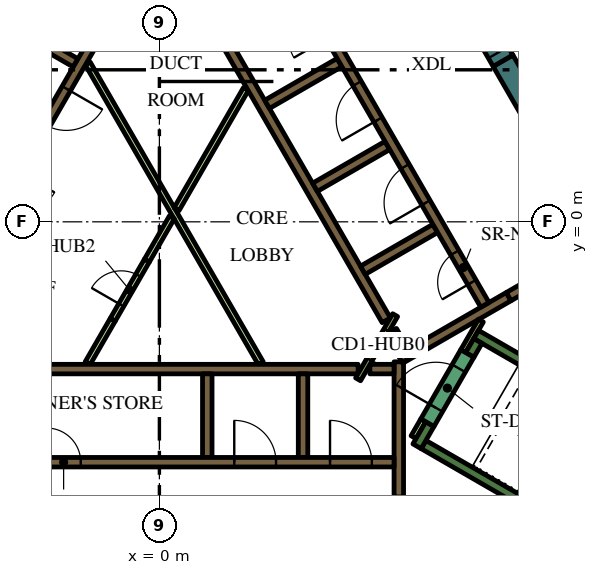
"""IFC4 building model, lengths in metres.
Left out: names, types, materials, properties, quantities, classifications, styles, units other than length and angle.
Written with IfcOpenShell. Run it as: python <this file> out.ifc"""

import sys

from ifc_helpers import new_model, si_unit, direction, frame, frame_2d, origin, place, context, subcontext, project, spatial, rectangle, extrude, element, fill, save


model = new_model("IFC4")
c1 = context("Model", 3, precision=1e-05, world=origin(), true_north=direction((0.0, 1.0)))
c2 = subcontext(c1, "Body", "Model", "MODEL_VIEW")
j1 = project(units=[si_unit("LENGTHUNIT", "METRE"), si_unit("PLANEANGLEUNIT", "RADIAN")], contexts=[c1])
p1 = place(None, origin())
s1 = spatial("IfcSite", under=j1, at=p1, CompositionType="ELEMENT")
p2 = place(p1, origin())
s2 = spatial("IfcBuilding", under=s1, at=p2, CompositionType="ELEMENT")
p3 = place(p2, frame((0.0, 0.0, 275.4)))
s3 = spatial("IfcBuildingStorey", under=s2, at=p3, CompositionType="ELEMENT", Elevation=275.4)
p4 = place(p3, frame((9.042, 4.239, 0.0), z_axis=(0.0, 0.0, 1.0), x_axis=(0.500005785455, -0.866022063525, 0.0)))
e1 = element("IfcWall", 1, at=p4, inside=s3, PredefinedType="SOLIDWALL", context=c2, shape_type="SweptSolid", body=[
    extrude(rectangle(XDim=12.406, YDim=0.6, at=frame_2d((6.203, 0.0))), origin(), (0.0, 0.0, 1.0), 4.2),
])
p5 = place(p3, frame((12.84, -9.261, 0.0), z_axis=(0.0, 0.0, 1.0), x_axis=(-0.866013990052, 0.500019768644, 0.0)))
e2 = element("IfcWall", 2, at=p5, inside=s3, PredefinedType="SOLIDWALL", context=c2, shape_type="SweptSolid", body=[
    extrude(rectangle(XDim=6.8, YDim=0.25, at=frame_2d((3.4, 0.0))), origin(), (0.0, 0.0, 1.0), 4.2),
])
p6 = place(p3, frame((6.78, -5.906, 0.0), z_axis=(0.0, 0.0, 1.0), x_axis=(0.500223362819, 0.865896406789, 0.0)))
e3 = element("IfcWall", 3, at=p6, inside=s3, PredefinedType="SOLIDWALL", context=c2, shape_type="SweptSolid", body=[
    extrude(rectangle(XDim=0.675, YDim=0.25, at=frame_2d((0.337, 0.0))), origin(), (0.0, 0.0, 1.0), 4.2),
])
p7 = place(p3, frame((8.334, -2.964, 0.0), z_axis=(0.0, 0.0, 1.0), x_axis=(0.866016039709, -0.500016218704, 0.0)))
e4 = element("IfcWall", 4, at=p7, inside=s3, PredefinedType="SOLIDWALL", context=c2, shape_type="SweptSolid", body=[
    extrude(rectangle(XDim=7.05, YDim=0.25, at=frame_2d((3.525, 0.0))), origin(), (0.0, 0.0, 1.0), 4.2),
])
p8 = place(p3, frame((8.168, -3.503, 0.0), z_axis=(0.0, 0.0, 1.0), x_axis=(0.49972245349, 0.866185586049, 0.0)))
e5 = element("IfcWall", 5, at=p8, inside=s3, PredefinedType="SOLIDWALL", context=c2, shape_type="SweptSolid", body=[
    extrude(rectangle(XDim=0.425, YDim=0.25, at=frame_2d((0.212, 0.0))), origin(), (0.0, 0.0, 1.0), 4.2),
])
p9 = place(p3, frame((6.3, -7.24, 0.0), z_axis=(0.0, 0.0, 1.0), x_axis=(0.0, 1.0, 0.0)))
e6 = element("IfcWall", 6, at=p9, inside=s3, PredefinedType="SOLIDWALL", context=c2, shape_type="SweptSolid", body=[
    extrude(rectangle(XDim=3.556, YDim=0.25, at=frame_2d((1.778, 0.0))), origin(), (0.0, 0.0, 1.0), 4.2),
])
p10 = place(p3, frame((5.538, -3.875, 0.0), z_axis=(0.0, 0.0, 1.0), x_axis=(1.0, 0.0, 0.0)))
e7 = element("IfcWall", 7, at=p10, inside=s3, PredefinedType="SOLIDWALL", context=c2, shape_type="SweptSolid", body=[
    extrude(rectangle(XDim=0.637, YDim=0.25, at=frame_2d((0.318, 0.0))), origin(), (0.0, 0.0, 1.0), 4.2),
])
p11 = place(p3, frame((-5.259, -3.875, 0.0), z_axis=(0.0, 0.0, 1.0), x_axis=(1.0, 0.0, 0.0)))
e8 = element("IfcWall", 8, at=p11, inside=s3, PredefinedType="SOLIDWALL", context=c2, shape_type="SweptSolid", body=[
    extrude(rectangle(XDim=10.489, YDim=0.25, at=frame_2d((5.244, 0.0))), origin(), (0.0, 0.0, 1.0), 4.2),
])
for number, where, z_axis, x_axis in (
    (9, (1.26, -4.0, 0.0), (0.0, 0.0, 1.0), (0.0, -1.0, 0.0)),
    (10, (3.78, -4.0, 0.0), (0.0, 0.0, 1.0), (0.0, -1.0, 0.0)),
):
    element("IfcWall", number, at=place(p3, frame(where, z_axis=z_axis, x_axis=x_axis)), inside=s3, PredefinedType="SOLIDWALL", context=c2, shape_type="SweptSolid", body=[
        extrude(rectangle(XDim=2.2, YDim=0.25, at=frame_2d((1.1, 0.0))), origin(), (0.0, 0.0, 1.0), 4.2),
    ])
p12 = place(p3, frame((9.19, -1.969, 0.0), z_axis=(0.0, 0.0, 1.0), x_axis=(-0.866057109641, -0.499945079824, 0.0)))
e11 = element("IfcWall", 11, at=p12, inside=s3, PredefinedType="SOLIDWALL", context=c2, shape_type="SweptSolid", body=[
    extrude(rectangle(XDim=3.291, YDim=0.25, at=frame_2d((1.646, 0.0))), origin(), (0.0, 0.0, 1.0), 4.2),
])
p13 = place(p3, frame((6.13, -2.867, 0.0), z_axis=(0.0, 0.0, 1.0), x_axis=(0.500160776593, -0.865932559475, 0.0)))
e12 = element("IfcWall", 12, at=p13, inside=s3, PredefinedType="SOLIDWALL", context=c2, shape_type="SweptSolid", body=[
    extrude(rectangle(XDim=0.627, YDim=0.25, at=frame_2d((0.313, 0.0))), origin(), (0.0, 0.0, 1.0), 4.2),
])
p14 = place(p3, frame((5.97, -2.591, 0.0), z_axis=(0.0, 0.0, 1.0), x_axis=(-0.499994469932, 0.866028596547, 0.0)))
e13 = element("IfcWall", 13, at=p14, inside=s3, PredefinedType="SOLIDWALL", context=c2, shape_type="SweptSolid", body=[
    extrude(rectangle(XDim=10.488, YDim=0.25, at=frame_2d((5.244, 0.0))), origin(), (0.0, 0.0, 1.0), 4.2),
])
for number, where, z_axis, x_axis in (
    (14, (2.834, 3.091, 0.0), (0.0, 0.0, 1.0), (0.866, 0.5, 0.0)),
    (15, (4.094, 0.909, 0.0), (0.0, 0.0, 1.0), (0.866, 0.5, 0.0)),
    (16, (5.354, -1.274, 0.0), (0.0, 0.0, 1.0), (0.866, 0.5, 0.0)),
    (17, (-2.204, 4.182, 0.0), (0.0, 0.0, 1.0), (-0.866, 0.5, 0.0)),
):
    element("IfcWall", number, at=place(p3, frame(where, z_axis=z_axis, x_axis=x_axis)), inside=s3, PredefinedType="SOLIDWALL", context=c2, shape_type="SweptSolid", body=[
        extrude(rectangle(XDim=2.2, YDim=0.25, at=frame_2d((1.1, 0.0))), origin(), (0.0, 0.0, 1.0), 4.2),
    ])
p15 = place(p3, frame((6.945, -5.222, 0.0), z_axis=(0.0, 0.0, 1.0), x_axis=(-0.499818422106, -0.866130212453, 0.0)))
e18 = element("IfcWall", 18, at=p15, inside=s3, PredefinedType="PARTITIONING", context=c2, shape_type="SweptSolid", body=[
    extrude(rectangle(XDim=0.514, YDim=0.15, at=frame_2d((0.257, 0.0))), origin(), (0.0, 0.0, 1.0), 3.55),
])
p16 = place(p3, frame((8.459, -2.599, 0.0), z_axis=(0.0, 0.0, 1.0), x_axis=(-0.500041054325, -0.866001699761, 0.0)))
e19 = element("IfcWall", 19, at=p16, inside=s3, PredefinedType="PARTITIONING", context=c2, shape_type="SweptSolid", body=[
    extrude(rectangle(XDim=0.929, YDim=0.15, at=frame_2d((0.464, 0.0))), origin(), (0.0, 0.0, 1.0), 4.2),
])
p17 = place(p3, frame((-1.887, 4.168, 0.0), z_axis=(0.0, 0.0, 1.0), x_axis=(0.499997069472, -0.866027095719, 0.0)))
e20 = element("IfcWall", 20, at=p17, inside=s3, PredefinedType="PARTITIONING", context=c2, shape_type="SweptSolid", body=[
    extrude(rectangle(XDim=9.106, YDim=0.15, at=frame_2d((4.553, 0.0))), origin(), (0.0, 0.0, 1.0), 3.55),
])
p18 = place(p3, frame((-0.329, -1.021, 0.0), z_axis=(0.0, 0.0, 1.0), x_axis=(0.500033191285, 0.866006239939, 0.0)))
e21 = element("IfcWall", 21, at=p18, inside=s3, PredefinedType="PARTITIONING", context=c2, shape_type="SweptSolid", body=[
    extrude(rectangle(XDim=1.315, YDim=0.15, at=frame_2d((0.657, 0.0))), origin(), (0.0, 0.0, 1.0), 3.55),
])
p19 = place(p3, frame((2.277, 3.493, 0.0), z_axis=(0.0, 0.0, 1.0), x_axis=(-0.499994550825, -0.866028549844, 0.0)))
e22 = element("IfcWall", 22, at=p19, inside=s3, PredefinedType="PARTITIONING", context=c2, shape_type="SweptSolid", body=[
    extrude(rectangle(XDim=3.65, YDim=0.15, at=frame_2d((1.825, 0.0))), origin(), (0.0, 0.0, 1.0), 3.55),
])
p20 = place(p3, frame((-1.887, -3.718, 0.0), z_axis=(0.0, 0.0, 1.0), x_axis=(0.500033191285, 0.866006239939, 0.0)))
e23 = element("IfcWall", 23, at=p20, inside=s3, PredefinedType="PARTITIONING", context=c2, shape_type="SweptSolid", body=[
    extrude(rectangle(XDim=1.315, YDim=0.15, at=frame_2d((0.657, 0.0))), origin(), (0.0, 0.0, 1.0), 3.55),
])
p21 = place(p3, frame((-6.175, -6.325, 0.0), z_axis=(0.0, 0.0, 1.0), x_axis=(1.0, 0.0, 0.0)))
e24 = element("IfcWall", 24, at=p21, inside=s3, PredefinedType="SOLIDWALL", context=c2, shape_type="SweptSolid", body=[
    extrude(rectangle(XDim=12.35, YDim=0.25, at=frame_2d((6.175, 0.0))), origin(), (0.0, 0.0, 1.0), 4.2),
])
p22 = place(p21, frame((3.205, 0.0, 0.0)))
e25 = element("IfcOpeningElement", 25, at=p22, cuts=e24, PredefinedType="OPENING", context=c2, shape_type="SweptSolid", body=[
    extrude(rectangle(XDim=0.9, YDim=2.1, at=frame_2d((0.45, 1.05))), frame((0.0, 0.135, 0.0), z_axis=(0.0, -1.0, 0.0), x_axis=(1.0, 0.0, 0.0)), (0.0, 0.0, 1.0), 0.27),
])
p23 = place(p21, frame((8.145, 0.0, 0.0)))
e26 = element("IfcOpeningElement", 26, at=p23, cuts=e24, PredefinedType="OPENING", context=c2, shape_type="SweptSolid", body=[
    extrude(rectangle(XDim=1.1, YDim=2.1, at=frame_2d((0.55, 1.05))), frame((0.0, 0.135, 0.0), z_axis=(0.0, -1.0, 0.0), x_axis=(1.0, 0.0, 0.0)), (0.0, 0.0, 1.0), 0.27),
])
p24 = place(p21, frame((10.665, 0.0, 0.0)))
e27 = element("IfcOpeningElement", 27, at=p24, cuts=e24, PredefinedType="OPENING", context=c2, shape_type="SweptSolid", body=[
    extrude(rectangle(XDim=1.1, YDim=2.1, at=frame_2d((0.55, 1.05))), frame((0.0, 0.135, 0.0), z_axis=(0.0, -1.0, 0.0), x_axis=(1.0, 0.0, 0.0)), (0.0, 0.0, 1.0), 0.27),
])
p25 = place(p3, frame((8.565, -2.185, 0.0), z_axis=(0.0, 0.0, 1.0), x_axis=(-0.499997954832, 0.866026584559, 0.0)))
e28 = element("IfcWall", 28, at=p25, inside=s3, PredefinedType="SOLIDWALL", context=c2, shape_type="SweptSolid", body=[
    extrude(rectangle(XDim=12.35, YDim=0.25, at=frame_2d((6.175, 0.0))), origin(), (0.0, 0.0, 1.0), 4.2),
])
p26 = place(p25, frame((0.685, 0.0, 0.0)))
e29 = element("IfcOpeningElement", 29, at=p26, cuts=e28, PredefinedType="OPENING", context=c2, shape_type="SweptSolid", body=[
    extrude(rectangle(XDim=0.9, YDim=2.1, at=frame_2d((0.45, 1.05))), frame((0.0, 0.135, 0.0), z_axis=(0.0, -1.0, 0.0), x_axis=(1.0, 0.0, 0.0)), (0.0, 0.0, 1.0), 0.27),
])
p27 = place(p25, frame((3.105, 0.0, 0.0)))
e30 = element("IfcOpeningElement", 30, at=p27, cuts=e28, PredefinedType="OPENING", context=c2, shape_type="SweptSolid", body=[
    extrude(rectangle(XDim=1.1, YDim=2.1, at=frame_2d((0.55, 1.05))), frame((0.0, 0.135, 0.0), z_axis=(0.0, -1.0, 0.0), x_axis=(1.0, 0.0, 0.0)), (0.0, 0.0, 1.0), 0.27),
])
p28 = place(p25, frame((5.625, 0.0, 0.0)))
e31 = element("IfcOpeningElement", 31, at=p28, cuts=e28, PredefinedType="OPENING", context=c2, shape_type="SweptSolid", body=[
    extrude(rectangle(XDim=1.1, YDim=2.1, at=frame_2d((0.55, 1.05))), frame((0.0, 0.135, 0.0), z_axis=(0.0, -1.0, 0.0), x_axis=(1.0, 0.0, 0.0)), (0.0, 0.0, 1.0), 0.27),
])
p29 = place(p25, frame((8.145, 0.0, 0.0)))
e32 = element("IfcOpeningElement", 32, at=p29, cuts=e28, PredefinedType="OPENING", context=c2, shape_type="SweptSolid", body=[
    extrude(rectangle(XDim=1.1, YDim=2.1, at=frame_2d((0.55, 1.05))), frame((0.0, 0.135, 0.0), z_axis=(0.0, -1.0, 0.0), x_axis=(1.0, 0.0, 0.0)), (0.0, 0.0, 1.0), 0.27),
])
p30 = place(p25, frame((10.665, 0.0, 0.0)))
e33 = element("IfcOpeningElement", 33, at=p30, cuts=e28, PredefinedType="OPENING", context=c2, shape_type="SweptSolid", body=[
    extrude(rectangle(XDim=1.1, YDim=2.1, at=frame_2d((0.55, 1.05))), frame((0.0, 0.135, 0.0), z_axis=(0.0, -1.0, 0.0), x_axis=(1.0, 0.0, 0.0)), (0.0, 0.0, 1.0), 0.27),
])
p31 = place(p3, frame((-0.898, 6.194, 0.0), z_axis=(0.0, 0.0, 1.0), x_axis=(-0.499996202215, -0.866027596426, 0.0)))
e34 = element("IfcWall", 34, at=p31, inside=s3, PredefinedType="SOLIDWALL", context=c2, shape_type="SweptSolid", body=[
    extrude(rectangle(XDim=9.83, YDim=0.25, at=frame_2d((4.915, 0.0))), origin(), (0.0, 0.0, 1.0), 4.2),
])
p32 = place(p31, frame((0.585, 0.0, 0.0)))
e35 = element("IfcOpeningElement", 35, at=p32, cuts=e34, PredefinedType="OPENING", context=c2, shape_type="SweptSolid", body=[
    extrude(rectangle(XDim=1.1, YDim=2.1, at=frame_2d((0.55, 1.05))), frame((0.0, 0.135, 0.0), z_axis=(0.0, -1.0, 0.0), x_axis=(1.0, 0.0, 0.0)), (0.0, 0.0, 1.0), 0.27),
])
p33 = place(p31, frame((3.105, 0.0, 0.0)))
e36 = element("IfcOpeningElement", 36, at=p33, cuts=e34, PredefinedType="OPENING", context=c2, shape_type="SweptSolid", body=[
    extrude(rectangle(XDim=1.1, YDim=2.1, at=frame_2d((0.55, 1.05))), frame((0.0, 0.135, 0.0), z_axis=(0.0, -1.0, 0.0), x_axis=(1.0, 0.0, 0.0)), (0.0, 0.0, 1.0), 0.27),
])
p34 = place(p31, frame((5.625, 0.0, 0.0)))
e37 = element("IfcOpeningElement", 37, at=p34, cuts=e34, PredefinedType="OPENING", context=c2, shape_type="SweptSolid", body=[
    extrude(rectangle(XDim=1.1, YDim=2.1, at=frame_2d((0.55, 1.05))), frame((0.0, 0.135, 0.0), z_axis=(0.0, -1.0, 0.0), x_axis=(1.0, 0.0, 0.0)), (0.0, 0.0, 1.0), 0.27),
])
p35 = place(p31, frame((8.145, 0.0, 0.0)))
e38 = element("IfcOpeningElement", 38, at=p35, cuts=e34, PredefinedType="OPENING", context=c2, shape_type="SweptSolid", body=[
    extrude(rectangle(XDim=1.1, YDim=2.1, at=frame_2d((0.55, 1.05))), frame((0.0, 0.135, 0.0), z_axis=(0.0, -1.0, 0.0), x_axis=(1.0, 0.0, 0.0)), (0.0, 0.0, 1.0), 0.27),
])
p36 = place(p3, frame((7.053, -5.284, 0.0), z_axis=(0.0, 0.0, 1.0), x_axis=(0.500078061341, 0.865980330357, 0.0)))
e39 = element("IfcWall", 39, at=p36, inside=s3, PredefinedType="SOLIDWALL", context=c2, shape_type="SweptSolid", body=[
    extrude(rectangle(XDim=2.1, YDim=0.4, at=frame_2d((1.05, 0.0))), origin(), (0.0, 0.0, 1.0), 4.2),
])
p37 = place(p36, frame((0.45, 0.0, 0.0)))
e40 = element("IfcOpeningElement", 40, at=p37, cuts=e39, PredefinedType="OPENING", context=c2, shape_type="SweptSolid", body=[
    extrude(rectangle(XDim=1.2, YDim=2.1, at=frame_2d((0.6, 1.05))), frame((0.0, 0.21, 0.0), z_axis=(0.0, -1.0, 0.0), x_axis=(1.0, 0.0, 0.0)), (0.0, 0.0, 1.0), 0.42),
])
p38 = place(p3, frame((6.203, -2.456, 0.0), z_axis=(0.0, 0.0, 1.0), x_axis=(-0.500043961785, -0.866000020948, 0.0)))
e41 = element("IfcWall", 41, at=p38, inside=s3, PredefinedType="PARTITIONING", context=c2, shape_type="SweptSolid", body=[
    extrude(rectangle(XDim=1.95, YDim=0.15, at=frame_2d((0.975, 0.0))), origin(), (0.0, 0.0, 1.0), 4.2),
])
p39 = place(p38, frame((0.45, 0.0, 0.0)))
e42 = element("IfcOpeningElement", 42, at=p39, cuts=e41, PredefinedType="OPENING", context=c2, shape_type="SweptSolid", body=[
    extrude(rectangle(XDim=0.9, YDim=2.1, at=frame_2d((0.45, 1.05))), frame((0.0, 0.085, 0.0), z_axis=(0.0, -1.0, 0.0), x_axis=(1.0, 0.0, 0.0)), (0.0, 0.0, 1.0), 0.17),
])
p40 = place(p3, frame((11.009, -0.919, 0.0), z_axis=(0.0, 0.0, 1.0), x_axis=(-0.866059744384, -0.49994051562, 0.0)))
e43 = element("IfcWall", 43, at=p40, inside=s3, PredefinedType="SOLIDWALL", context=c2, shape_type="SweptSolid", body=[
    extrude(rectangle(XDim=2.1, YDim=0.25, at=frame_2d((1.05, 0.0))), origin(), (0.0, 0.0, 1.0), 4.2),
])
p41 = place(p40, frame((0.45, 0.0, 0.0)))
e44 = element("IfcOpeningElement", 44, at=p41, cuts=e43, PredefinedType="OPENING", context=c2, shape_type="SweptSolid", body=[
    extrude(rectangle(XDim=1.2, YDim=2.1, at=frame_2d((0.6, 1.05))), frame((0.0, 0.135, 0.0), z_axis=(0.0, -1.0, 0.0), x_axis=(1.0, 0.0, 0.0)), (0.0, 0.0, 1.0), 0.27),
])
p42 = place(p3, frame((8.192, 5.711, 0.0), z_axis=(0.0, 0.0, 1.0), x_axis=(0.500062241894, -0.865989465428, 0.0)))
e45 = element("IfcWall", 45, at=p42, inside=s3, PredefinedType="SOLIDWALL", context=c2, shape_type="SweptSolid", body=[
    extrude(rectangle(XDim=1.7, YDim=0.6, at=frame_2d((0.85, 0.0))), origin(), (0.0, 0.0, 1.0), 4.2),
])
p43 = place(p42, frame((0.25, 0.0, 0.0)))
e46 = element("IfcOpeningElement", 46, at=p43, cuts=e45, PredefinedType="OPENING", context=c2, shape_type="SweptSolid", body=[
    extrude(rectangle(XDim=1.2, YDim=2.1, at=frame_2d((0.6, 1.05))), frame((0.0, 0.31, 0.0), z_axis=(0.0, -1.0, 0.0), x_axis=(1.0, 0.0, 0.0)), (0.0, 0.0, 1.0), 0.62),
])
p44 = place(p3, frame((-1.229, -2.579, 0.0), z_axis=(0.0, 0.0, 1.0), x_axis=(0.500062916607, 0.865989075817, 0.0)))
e47 = element("IfcWall", 47, at=p44, inside=s3, PredefinedType="PARTITIONING", context=c2, shape_type="SweptSolid", body=[
    extrude(rectangle(XDim=1.8, YDim=0.15, at=frame_2d((0.9, 0.0))), origin(), (0.0, 0.0, 1.0), 3.55),
])
p45 = place(p44, frame((0.45, 0.0, 0.0)))
e48 = element("IfcOpeningElement", 48, at=p45, cuts=e47, PredefinedType="OPENING", context=c2, shape_type="SweptSolid", body=[
    extrude(rectangle(XDim=0.9, YDim=2.1, at=frame_2d((0.45, 1.05))), frame((0.0, 0.085, 0.0), z_axis=(0.0, -1.0, 0.0), x_axis=(1.0, 0.0, 0.0)), (0.0, 0.0, 1.0), 0.17),
])
p46 = place(p3, frame((13.436, 0.829, 0.0), z_axis=(0.0, 0.0, 1.0), x_axis=(-0.49999894854, 0.866026010844, 0.0)))
e49 = element("IfcWall", 49, at=p46, inside=s3, PredefinedType="PARTITIONING", context=c2, shape_type="SweptSolid", body=[
    extrude(rectangle(XDim=12.0, YDim=0.2, at=frame_2d((6.0, 0.0))), origin(), (0.0, 0.0, 1.0), 3.55),
])
p47 = place(p46, frame((5.5, 0.0, 0.0)))
e50 = element("IfcOpeningElement", 50, at=p47, cuts=e49, PredefinedType="OPENING", context=c2, shape_type="SweptSolid", body=[
    extrude(rectangle(XDim=1.0, YDim=2.1, at=frame_2d((0.5, 1.05))), frame((0.0, 0.11, 0.0), z_axis=(0.0, -1.0, 0.0), x_axis=(1.0, 0.0, 0.0)), (0.0, 0.0, 1.0), 0.22),
])
p48 = place(p22, origin())
e51 = element("IfcDoor", 51, at=p48, inside=s3, OperationType="SINGLE_SWING_LEFT", PredefinedType="DOOR", context=c2, shape_type="SweptSolid", body=[
    extrude(rectangle(XDim=0.9, YDim=2.1, at=frame_2d((0.45, 1.05))), frame((0.0, 0.025, 0.0), z_axis=(0.0, -1.0, 0.0), x_axis=(1.0, 0.0, 0.0)), (0.0, 0.0, 1.0), 0.05),
])
fill(e25, e51)
p49 = place(p23, origin())
e52 = element("IfcDoor", 52, at=p49, inside=s3, OperationType="DOUBLE_DOOR_SLIDING", PredefinedType="DOOR", context=c2, shape_type="SweptSolid", body=[
    extrude(rectangle(XDim=1.1, YDim=2.1, at=frame_2d((0.55, 1.05))), frame((0.0, 0.025, 0.0), z_axis=(0.0, -1.0, 0.0), x_axis=(1.0, 0.0, 0.0)), (0.0, 0.0, 1.0), 0.05),
])
fill(e26, e52)
p50 = place(p24, origin())
e53 = element("IfcDoor", 53, at=p50, inside=s3, OperationType="DOUBLE_DOOR_SLIDING", PredefinedType="DOOR", context=c2, shape_type="SweptSolid", body=[
    extrude(rectangle(XDim=1.1, YDim=2.1, at=frame_2d((0.55, 1.05))), frame((0.0, 0.025, 0.0), z_axis=(0.0, -1.0, 0.0), x_axis=(1.0, 0.0, 0.0)), (0.0, 0.0, 1.0), 0.05),
])
fill(e27, e53)
p51 = place(p26, origin())
e54 = element("IfcDoor", 54, at=p51, inside=s3, OperationType="SINGLE_SWING_LEFT", PredefinedType="DOOR", context=c2, shape_type="SweptSolid", body=[
    extrude(rectangle(XDim=0.9, YDim=2.1, at=frame_2d((0.45, 1.05))), frame((0.0, 0.025, 0.0), z_axis=(0.0, -1.0, 0.0), x_axis=(1.0, 0.0, 0.0)), (0.0, 0.0, 1.0), 0.05),
])
fill(e29, e54)
p52 = place(p27, origin())
e55 = element("IfcDoor", 55, at=p52, inside=s3, OperationType="DOUBLE_DOOR_SLIDING", PredefinedType="DOOR", context=c2, shape_type="SweptSolid", body=[
    extrude(rectangle(XDim=1.1, YDim=2.1, at=frame_2d((0.55, 1.05))), frame((0.0, 0.025, 0.0), z_axis=(0.0, -1.0, 0.0), x_axis=(1.0, 0.0, 0.0)), (0.0, 0.0, 1.0), 0.05),
])
fill(e30, e55)
p53 = place(p28, origin())
e56 = element("IfcDoor", 56, at=p53, inside=s3, OperationType="DOUBLE_DOOR_SLIDING", PredefinedType="DOOR", context=c2, shape_type="SweptSolid", body=[
    extrude(rectangle(XDim=1.1, YDim=2.1, at=frame_2d((0.55, 1.05))), frame((0.0, 0.025, 0.0), z_axis=(0.0, -1.0, 0.0), x_axis=(1.0, 0.0, 0.0)), (0.0, 0.0, 1.0), 0.05),
])
fill(e31, e56)
p54 = place(p33, origin())
e57 = element("IfcDoor", 57, at=p54, inside=s3, OperationType="DOUBLE_DOOR_SLIDING", PredefinedType="DOOR", context=c2, shape_type="SweptSolid", body=[
    extrude(rectangle(XDim=1.1, YDim=2.1, at=frame_2d((0.55, 1.05))), frame((0.0, 0.025, 0.0), z_axis=(0.0, -1.0, 0.0), x_axis=(1.0, 0.0, 0.0)), (0.0, 0.0, 1.0), 0.05),
])
fill(e36, e57)
p55 = place(p37, origin())
e58 = element("IfcDoor", 58, at=p55, inside=s3, OperationType="SINGLE_SWING_LEFT", PredefinedType="DOOR", context=c2, shape_type="SweptSolid", body=[
    extrude(rectangle(XDim=1.2, YDim=2.1, at=frame_2d((0.6, 1.05))), frame((0.0, 0.025, 0.0), z_axis=(0.0, -1.0, 0.0), x_axis=(1.0, 0.0, 0.0)), (0.0, 0.0, 1.0), 0.05),
])
fill(e40, e58)
p56 = place(p39, origin())
e59 = element("IfcDoor", 59, at=p56, inside=s3, OperationType="SINGLE_SWING_LEFT", PredefinedType="DOOR", context=c2, shape_type="SweptSolid", body=[
    extrude(rectangle(XDim=0.9, YDim=2.1, at=frame_2d((0.45, 1.05))), frame((0.0, 0.025, 0.0), z_axis=(0.0, -1.0, 0.0), x_axis=(1.0, 0.0, 0.0)), (0.0, 0.0, 1.0), 0.05),
])
fill(e42, e59)
p57 = place(p43, origin())
e60 = element("IfcDoor", 60, at=p57, inside=s3, OperationType="SINGLE_SWING_LEFT", PredefinedType="DOOR", context=c2, shape_type="SweptSolid", body=[
    extrude(rectangle(XDim=1.2, YDim=2.1, at=frame_2d((0.6, 1.05))), frame((0.0, 0.025, 0.0), z_axis=(0.0, -1.0, 0.0), x_axis=(1.0, 0.0, 0.0)), (0.0, 0.0, 1.0), 0.05),
])
fill(e46, e60)
p58 = place(p45, origin())
e61 = element("IfcDoor", 61, at=p58, inside=s3, OperationType="SINGLE_SWING_LEFT", PredefinedType="DOOR", context=c2, shape_type="SweptSolid", body=[
    extrude(rectangle(XDim=0.9, YDim=2.1, at=frame_2d((0.45, 1.05))), frame((0.0, 0.025, 0.0), z_axis=(0.0, -1.0, 0.0), x_axis=(1.0, 0.0, 0.0)), (0.0, 0.0, 1.0), 0.05),
])
fill(e48, e61)
save(model, sys.argv[1])
